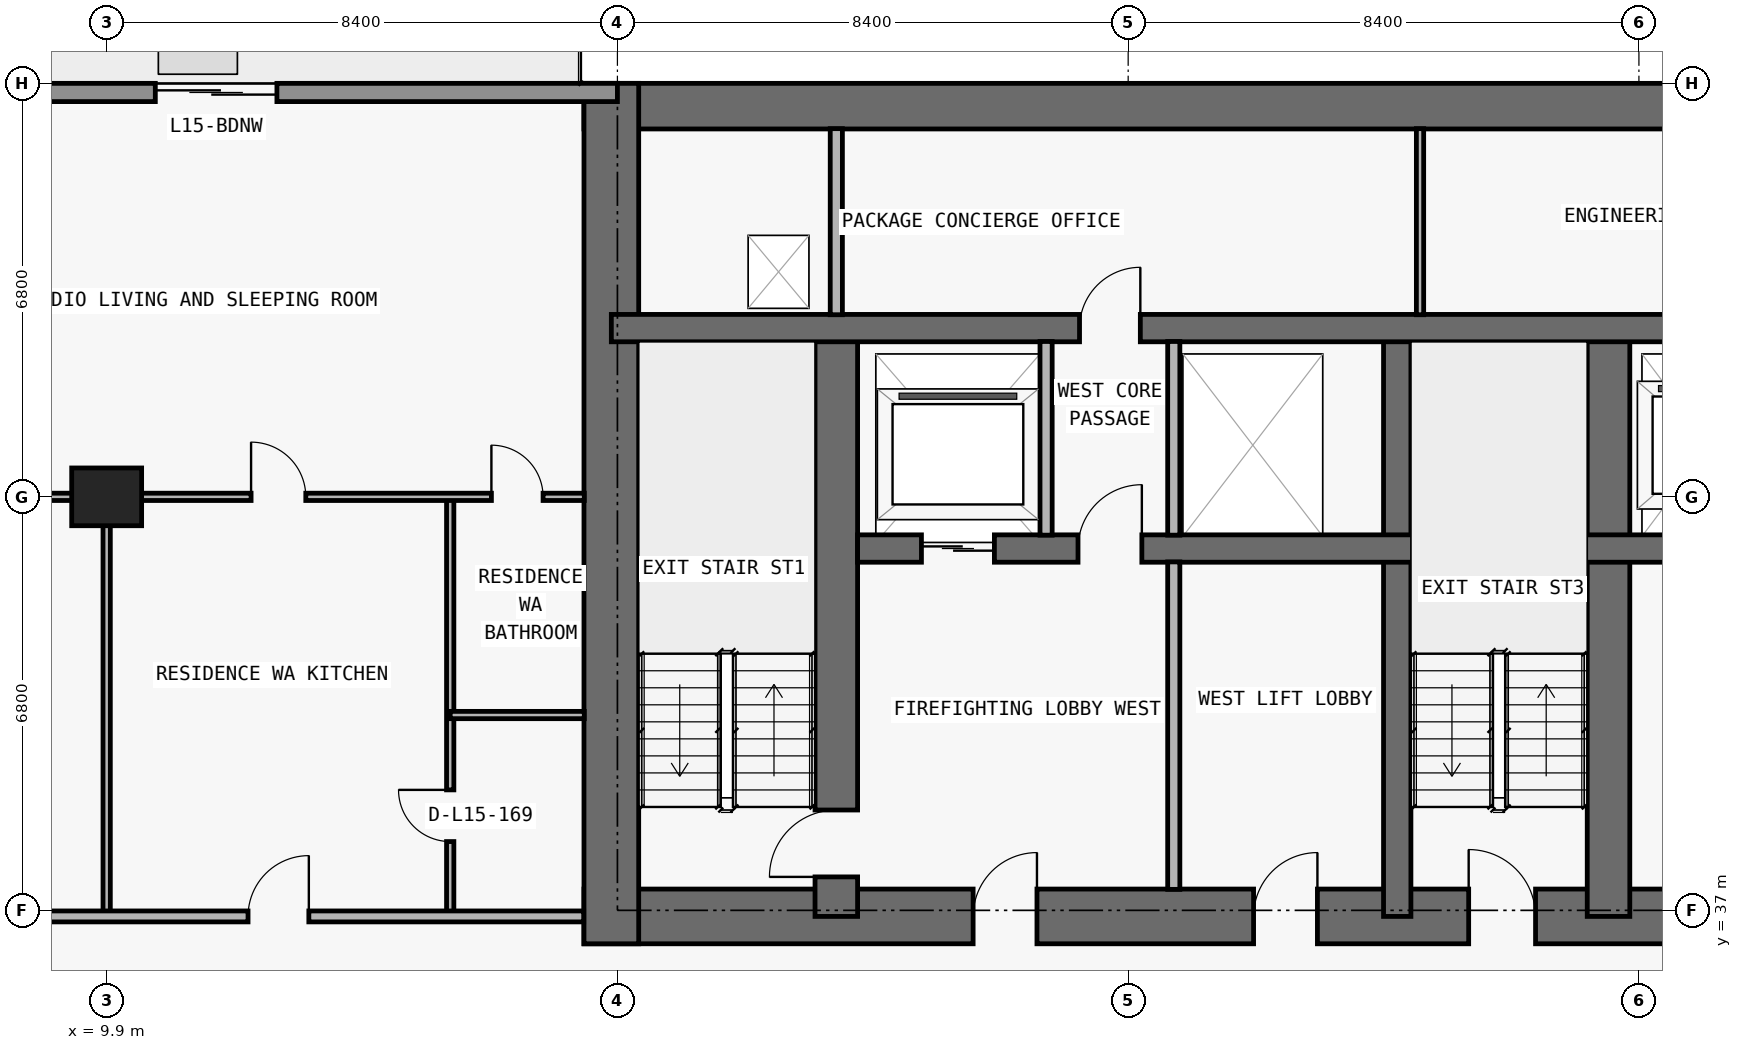
"""IFC4 building model, lengths in metres.
Left out: names, types, materials, properties, quantities, classifications, styles, units other than length and angle.
Written with IfcOpenShell. Run it as: python <this file> out.ifc"""

import sys

from ifc_helpers import new_model, si_unit, direction, frame, frame_2d, origin, origin_2d, place, context, subcontext, project, spatial, rectangle, extrude, element, fill, save


model = new_model("IFC4")
c1 = context("Model", 3, precision=1e-05, world=origin(), true_north=direction((0.0, 1.0)))
c2 = subcontext(c1, "Body", "Model", "MODEL_VIEW")
j1 = project(units=[si_unit("LENGTHUNIT", "METRE"), si_unit("PLANEANGLEUNIT", "RADIAN")], contexts=[c1])
p1 = place(None, origin())
s1 = spatial("IfcSite", under=j1, at=p1, CompositionType="ELEMENT")
p2 = place(p1, origin())
s2 = spatial("IfcBuilding", under=s1, at=p2, CompositionType="ELEMENT")
p3 = place(p2, frame((0.0, 0.0, 59.7)))
s3 = spatial("IfcBuildingStorey", under=s2, at=p3, CompositionType="ELEMENT", Elevation=59.7)
p4 = place(p3, frame((9.9, 43.8, 0.0), z_axis=(0.0, 0.0, 1.0), x_axis=(1.0, 0.0, 0.0)))
e1 = element("IfcColumn", 1, at=p4, inside=s3, PredefinedType="COLUMN", context=c2, shape_type="SweptSolid", body=[
    extrude(rectangle(XDim=1.15, YDim=0.95, at=origin_2d()), origin(), (0.0, 0.0, 1.0), 3.05),
])
p5 = place(p3, frame((17.75, 36.9, 0.0), z_axis=(0.0, 0.0, 1.0), x_axis=(1.0, 0.0, 0.0)))
e2 = element("IfcWall", 2, at=p5, inside=s3, PredefinedType="SHEAR", context=c2, shape_type="SweptSolid", body=[
    extrude(rectangle(XDim=42.3, YDim=0.9, at=frame_2d((21.15, 0.0))), origin(), (0.0, 0.0, 1.0), 3.05),
])
p6 = place(p5, frame((14.55, 0.0, 0.0)))
e3 = element("IfcOpeningElement", 3, at=p6, cuts=e2, PredefinedType="OPENING", context=c2, shape_type="SweptSolid", body=[
    extrude(rectangle(XDim=1.1, YDim=2.15, at=frame_2d((0.55, 1.075))), frame((0.0, 0.46, 0.0), z_axis=(0.0, -1.0, 0.0), x_axis=(1.0, 0.0, 0.0)), (0.0, 0.0, 1.0), 0.92),
])
p7 = place(p5, frame((6.4, 0.0, 0.0)))
e4 = element("IfcOpeningElement", 4, at=p7, cuts=e2, PredefinedType="OPENING", context=c2, shape_type="SweptSolid", body=[
    extrude(rectangle(XDim=1.05, YDim=2.15, at=frame_2d((0.525, 1.075))), frame((0.0, 0.46, 0.0), z_axis=(0.0, -1.0, 0.0), x_axis=(1.0, 0.0, 0.0)), (0.0, 0.0, 1.0), 0.92),
])
p8 = place(p5, frame((34.9, 0.0, 0.0)))
e5 = element("IfcOpeningElement", 5, at=p8, cuts=e2, PredefinedType="OPENING", context=c2, shape_type="SweptSolid", body=[
    extrude(rectangle(XDim=1.05, YDim=2.15, at=frame_2d((0.525, 1.075))), frame((0.0, 0.46, 0.0), z_axis=(0.0, -1.0, 0.0), x_axis=(1.0, 0.0, 0.0)), (0.0, 0.0, 1.0), 0.92),
])
p9 = place(p5, frame((11.012, 0.0, 0.0)))
e6 = element("IfcOpeningElement", 6, at=p9, cuts=e2, PredefinedType="OPENING", context=c2, shape_type="SweptSolid", body=[
    extrude(rectangle(XDim=1.05, YDim=2.15, at=frame_2d((0.525, 1.075))), frame((0.0, 0.46, 0.0), z_axis=(0.0, -1.0, 0.0), x_axis=(1.0, 0.0, 0.0)), (0.0, 0.0, 1.0), 0.92),
])
p10 = place(p5, frame((24.25, 0.0, 0.0)))
e7 = element("IfcOpeningElement", 7, at=p10, cuts=e2, PredefinedType="OPENING", context=c2, shape_type="SweptSolid", body=[
    extrude(rectangle(XDim=1.05, YDim=2.15, at=frame_2d((0.525, 1.075))), frame((0.0, 0.46, 0.0), z_axis=(0.0, -1.0, 0.0), x_axis=(1.0, 0.0, 0.0)), (0.0, 0.0, 1.0), 0.92),
])
p11 = place(p3, frame((17.75, 50.225, 0.0), z_axis=(0.0, 0.0, 1.0), x_axis=(1.0, 0.0, 0.0)))
e8 = element("IfcWall", 8, at=p11, inside=s3, PredefinedType="SHEAR", context=c2, shape_type="SweptSolid", body=[
    extrude(rectangle(XDim=42.3, YDim=0.75, at=frame_2d((21.15, 0.0))), origin(), (0.0, 0.0, 1.0), 3.05),
])
p12 = place(p3, frame((18.2, 36.45, 0.0), z_axis=(0.0, 0.0, 1.0), x_axis=(0.0, 1.0, 0.0)))
e9 = element("IfcWall", 9, at=p12, inside=s3, PredefinedType="SHEAR", context=c2, shape_type="SweptSolid", body=[
    extrude(rectangle(XDim=14.15, YDim=0.9, at=frame_2d((7.075, 0.0))), origin(), (0.0, 0.0, 1.0), 3.05),
])
p13 = place(p3, frame((21.9, 36.9, 0.0), z_axis=(0.0, 0.0, 1.0), x_axis=(0.0, 1.0, 0.0)))
e10 = element("IfcWall", 10, at=p13, inside=s3, PredefinedType="SHEAR", context=c2, shape_type="SweptSolid", body=[
    extrude(rectangle(XDim=9.675, YDim=0.7, at=frame_2d((4.837, 0.0))), origin(), (0.0, 0.0, 1.0), 3.05),
])
p14 = place(p13, frame((0.65, 0.0, 0.0)))
e11 = element("IfcOpeningElement", 11, at=p14, cuts=e10, PredefinedType="OPENING", context=c2, shape_type="SweptSolid", body=[
    extrude(rectangle(XDim=1.1, YDim=2.15, at=frame_2d((0.55, 1.075))), frame((0.0, 0.36, 0.0), z_axis=(0.0, -1.0, 0.0), x_axis=(1.0, 0.0, 0.0)), (0.0, 0.0, 1.0), 0.72),
])
p15 = place(p3, frame((31.125, 36.9, 0.0), z_axis=(0.0, 0.0, 1.0), x_axis=(0.0, 1.0, 0.0)))
e12 = element("IfcWall", 12, at=p15, inside=s3, PredefinedType="SHEAR", context=c2, shape_type="SweptSolid", body=[
    extrude(rectangle(XDim=9.675, YDim=0.45, at=frame_2d((4.837, 0.0))), origin(), (0.0, 0.0, 1.0), 3.05),
])
p16 = place(p3, frame((34.6, 36.9, 0.0), z_axis=(0.0, 0.0, 1.0), x_axis=(0.0, 1.0, 0.0)))
e13 = element("IfcWall", 13, at=p16, inside=s3, PredefinedType="SHEAR", context=c2, shape_type="SweptSolid", body=[
    extrude(rectangle(XDim=9.675, YDim=0.7, at=frame_2d((4.837, 0.0))), origin(), (0.0, 0.0, 1.0), 3.05),
])
p17 = place(p3, frame((22.25, 42.95, 0.0), z_axis=(0.0, 0.0, 1.0), x_axis=(1.0, 0.0, 0.0)))
e14 = element("IfcWall", 14, at=p17, inside=s3, PredefinedType="SHEAR", context=c2, shape_type="SweptSolid", body=[
    extrude(rectangle(XDim=33.3, YDim=0.45, at=frame_2d((16.65, 0.0))), origin(), (0.0, 0.0, 1.0), 3.05),
])
p18 = place(p17, frame((1.05, 0.0, 0.0)))
e15 = element("IfcOpeningElement", 15, at=p18, cuts=e14, PredefinedType="OPENING", context=c2, shape_type="SweptSolid", body=[
    extrude(rectangle(XDim=1.2, YDim=2.2, at=frame_2d((0.6, 1.1))), frame((0.0, 0.235, 0.0), z_axis=(0.0, -1.0, 0.0), x_axis=(1.0, 0.0, 0.0)), (0.0, 0.0, 1.0), 0.47),
])
p19 = place(p17, frame((31.05, 0.0, 0.0)))
e16 = element("IfcOpeningElement", 16, at=p19, cuts=e14, PredefinedType="OPENING", context=c2, shape_type="SweptSolid", body=[
    extrude(rectangle(XDim=1.2, YDim=2.2, at=frame_2d((0.6, 1.1))), frame((0.0, 0.235, 0.0), z_axis=(0.0, -1.0, 0.0), x_axis=(1.0, 0.0, 0.0)), (0.0, 0.0, 1.0), 0.47),
])
p20 = place(p17, frame((13.5, 0.0, 0.0)))
e17 = element("IfcOpeningElement", 17, at=p20, cuts=e14, PredefinedType="OPENING", context=c2, shape_type="SweptSolid", body=[
    extrude(rectangle(XDim=1.1, YDim=2.2, at=frame_2d((0.55, 1.1))), frame((0.0, 0.235, 0.0), z_axis=(0.0, -1.0, 0.0), x_axis=(1.0, 0.0, 0.0)), (0.0, 0.0, 1.0), 0.47),
])
p21 = place(p17, frame((16.1, 0.0, 0.0)))
e18 = element("IfcOpeningElement", 18, at=p21, cuts=e14, PredefinedType="OPENING", context=c2, shape_type="SweptSolid", body=[
    extrude(rectangle(XDim=1.1, YDim=2.2, at=frame_2d((0.55, 1.1))), frame((0.0, 0.235, 0.0), z_axis=(0.0, -1.0, 0.0), x_axis=(1.0, 0.0, 0.0)), (0.0, 0.0, 1.0), 0.47),
])
p22 = place(p17, frame((18.7, 0.0, 0.0)))
e19 = element("IfcOpeningElement", 19, at=p22, cuts=e14, PredefinedType="OPENING", context=c2, shape_type="SweptSolid", body=[
    extrude(rectangle(XDim=1.1, YDim=2.2, at=frame_2d((0.55, 1.1))), frame((0.0, 0.235, 0.0), z_axis=(0.0, -1.0, 0.0), x_axis=(1.0, 0.0, 0.0)), (0.0, 0.0, 1.0), 0.47),
])
p23 = place(p17, frame((3.625, 0.0, 0.0)))
e20 = element("IfcOpeningElement", 20, at=p23, cuts=e14, PredefinedType="OPENING", context=c2, shape_type="SweptSolid", body=[
    extrude(rectangle(XDim=1.05, YDim=2.15, at=frame_2d((0.525, 1.075))), frame((0.0, 0.235, 0.0), z_axis=(0.0, -1.0, 0.0), x_axis=(1.0, 0.0, 0.0)), (0.0, 0.0, 1.0), 0.47),
])
p24 = place(p17, frame((28.675, 0.0, 0.0)))
e21 = element("IfcOpeningElement", 21, at=p24, cuts=e14, PredefinedType="OPENING", context=c2, shape_type="SweptSolid", body=[
    extrude(rectangle(XDim=1.05, YDim=2.15, at=frame_2d((0.525, 1.075))), frame((0.0, 0.235, 0.0), z_axis=(0.0, -1.0, 0.0), x_axis=(1.0, 0.0, 0.0)), (0.0, 0.0, 1.0), 0.47),
])
p25 = place(p3, frame((18.2, 46.575, 0.0), z_axis=(0.0, 0.0, 1.0), x_axis=(1.0, 0.0, 0.0)))
e22 = element("IfcWall", 22, at=p25, inside=s3, PredefinedType="SHEAR", context=c2, shape_type="SweptSolid", body=[
    extrude(rectangle(XDim=41.4, YDim=0.45, at=frame_2d((20.7, 0.0))), origin(), (0.0, 0.0, 1.0), 3.05),
])
p26 = place(p25, frame((7.7, 0.0, 0.0)))
e23 = element("IfcOpeningElement", 23, at=p26, cuts=e22, PredefinedType="OPENING", context=c2, shape_type="SweptSolid", body=[
    extrude(rectangle(XDim=1.0, YDim=2.2, at=frame_2d((0.5, 1.1))), frame((0.0, 0.235, 0.0), z_axis=(0.0, -1.0, 0.0), x_axis=(1.0, 0.0, 0.0)), (0.0, 0.0, 1.0), 0.47),
])
p27 = place(p25, frame((32.725, 0.0, 0.0)))
e24 = element("IfcOpeningElement", 24, at=p27, cuts=e22, PredefinedType="OPENING", context=c2, shape_type="SweptSolid", body=[
    extrude(rectangle(XDim=1.05, YDim=2.15, at=frame_2d((0.525, 1.075))), frame((0.0, 0.235, 0.0), z_axis=(0.0, -1.0, 0.0), x_axis=(1.0, 0.0, 0.0)), (0.0, 0.0, 1.0), 0.47),
])
p28 = place(p3, frame((5.1, 50.45, 0.0), z_axis=(0.0, 0.0, 1.0), x_axis=(1.0, 0.0, 0.0)))
e25 = element("IfcWall", 25, at=p28, inside=s3, PredefinedType="STANDARD", context=c2, shape_type="SweptSolid", body=[
    extrude(rectangle(XDim=13.2, YDim=0.3, at=frame_2d((6.6, 0.0))), origin(), (0.0, 0.0, 1.0), 3.05),
])
p29 = place(p28, frame((5.6, 0.0, 0.0)))
e26 = element("IfcOpeningElement", 26, at=p29, cuts=e25, PredefinedType="OPENING", context=c2, shape_type="SweptSolid", body=[
    extrude(rectangle(XDim=2.0, YDim=2.3, at=frame_2d((1.0, 1.15))), frame((0.0, 0.16, 0.0), z_axis=(0.0, -1.0, 0.0), x_axis=(1.0, 0.0, 0.0)), (0.0, 0.0, 1.0), 0.32),
])
p30 = place(p3, frame((9.9, 36.9, 0.0), z_axis=(0.0, 0.0, 1.0), x_axis=(0.0, 1.0, 0.0)))
e27 = element("IfcWall", 27, at=p30, inside=s3, PredefinedType="PARTITIONING", context=c2, shape_type="SweptSolid", body=[
    extrude(rectangle(XDim=6.9, YDim=0.12, at=frame_2d((3.45, 0.0))), origin(), (0.0, 0.0, 1.0), 2.11),
])
p31 = place(p3, frame((15.55, 36.9, 0.0), z_axis=(0.0, 0.0, 1.0), x_axis=(0.0, 1.0, 0.0)))
e28 = element("IfcWall", 28, at=p31, inside=s3, PredefinedType="PARTITIONING", context=c2, shape_type="SweptSolid", body=[
    extrude(rectangle(XDim=6.9, YDim=0.12, at=frame_2d((3.45, 0.0))), origin(), (0.0, 0.0, 1.0), 3.05),
])
p32 = place(p31, frame((1.231, 0.0, 0.0)))
e29 = element("IfcOpeningElement", 29, at=p32, cuts=e28, PredefinedType="OPENING", context=c2, shape_type="SweptSolid", body=[
    extrude(rectangle(XDim=0.85, YDim=2.1, at=frame_2d((0.425, 1.05))), frame((0.0, 0.07, 0.0), z_axis=(0.0, -1.0, 0.0), x_axis=(1.0, 0.0, 0.0)), (0.0, 0.0, 1.0), 0.14),
])
p33 = place(p3, frame((21.9, 46.795, 0.0), z_axis=(0.0, 0.0, 1.0), x_axis=(0.0, 1.0, 0.0)))
e30 = element("IfcWall", 30, at=p33, inside=s3, PredefinedType="PARTITIONING", context=c2, shape_type="SweptSolid", body=[
    extrude(rectangle(XDim=3.06, YDim=0.2, at=frame_2d((1.53, 0.0))), origin(), (0.0, 0.0, 1.0), 3.05),
])
p34 = place(p3, frame((25.35, 43.17, 0.0), z_axis=(0.0, 0.0, 1.0), x_axis=(0.0, 1.0, 0.0)))
e31 = element("IfcWall", 31, at=p34, inside=s3, PredefinedType="PARTITIONING", context=c2, shape_type="SweptSolid", body=[
    extrude(rectangle(XDim=3.185, YDim=0.2, at=frame_2d((1.593, 0.0))), origin(), (0.0, 0.0, 1.0), 3.05),
])
p35 = place(p3, frame((27.45, 37.345, 0.0), z_axis=(0.0, 0.0, 1.0), x_axis=(0.0, 1.0, 0.0)))
e32 = element("IfcWall", 32, at=p35, inside=s3, PredefinedType="PARTITIONING", context=c2, shape_type="SweptSolid", body=[
    extrude(rectangle(XDim=5.385, YDim=0.2, at=frame_2d((2.692, 0.0))), origin(), (0.0, 0.0, 1.0), 3.05),
])
p36 = place(p3, frame((27.45, 43.17, 0.0), z_axis=(0.0, 0.0, 1.0), x_axis=(0.0, 1.0, 0.0)))
e33 = element("IfcWall", 33, at=p36, inside=s3, PredefinedType="PARTITIONING", context=c2, shape_type="SweptSolid", body=[
    extrude(rectangle(XDim=3.185, YDim=0.2, at=frame_2d((1.593, 0.0))), origin(), (0.0, 0.0, 1.0), 3.05),
])
p37 = place(p3, frame((31.5, 46.795, 0.0), z_axis=(0.0, 0.0, 1.0), x_axis=(0.0, 1.0, 0.0)))
e34 = element("IfcWall", 34, at=p37, inside=s3, PredefinedType="PARTITIONING", context=c2, shape_type="SweptSolid", body=[
    extrude(rectangle(XDim=3.06, YDim=0.12, at=frame_2d((1.53, 0.0))), origin(), (0.0, 0.0, 1.0), 3.05),
])
p38 = place(p3, frame((5.1, 36.9, 0.0), z_axis=(0.0, 0.0, 1.0), x_axis=(1.0, 0.0, 0.0)))
e35 = element("IfcWall", 35, at=p38, inside=s3, PredefinedType="PARTITIONING", context=c2, shape_type="SweptSolid", body=[
    extrude(rectangle(XDim=12.645, YDim=0.18, at=frame_2d((6.323, 0.0))), origin(), (0.0, 0.0, 1.0), 3.05),
])
p39 = place(p38, frame((7.125, 0.0, 0.0)))
e36 = element("IfcOpeningElement", 36, at=p39, cuts=e35, PredefinedType="OPENING", context=c2, shape_type="SweptSolid", body=[
    extrude(rectangle(XDim=1.0, YDim=2.2, at=frame_2d((0.5, 1.1))), frame((0.0, 0.1, 0.0), z_axis=(0.0, -1.0, 0.0), x_axis=(1.0, 0.0, 0.0)), (0.0, 0.0, 1.0), 0.2),
])
p40 = place(p3, frame((15.55, 40.212, 0.0), z_axis=(0.0, 0.0, 1.0), x_axis=(1.0, 0.0, 0.0)))
e37 = element("IfcWall", 37, at=p40, inside=s3, PredefinedType="PARTITIONING", context=c2, shape_type="SweptSolid", body=[
    extrude(rectangle(XDim=2.205, YDim=0.12, at=frame_2d((1.103, 0.0))), origin(), (0.0, 0.0, 1.0), 3.05),
])
p41 = place(p3, frame((1.795, 43.8, 0.0), z_axis=(0.0, 0.0, 1.0), x_axis=(1.0, 0.0, 0.0)))
e38 = element("IfcWall", 38, at=p41, inside=s3, PredefinedType="PARTITIONING", context=c2, shape_type="SweptSolid", body=[
    extrude(rectangle(XDim=15.96, YDim=0.12, at=frame_2d((7.98, 0.0))), origin(), (0.0, 0.0, 1.0), 2.339),
])
p42 = place(p41, frame((5.255, 0.0, 0.0)))
e39 = element("IfcOpeningElement", 39, at=p42, cuts=e38, PredefinedType="OPENING", context=c2, shape_type="SweptSolid", body=[
    extrude(rectangle(XDim=0.9, YDim=2.15, at=frame_2d((0.45, 1.075))), frame((0.0, 0.07, 0.0), z_axis=(0.0, -1.0, 0.0), x_axis=(1.0, 0.0, 0.0)), (0.0, 0.0, 1.0), 0.14),
])
p43 = place(p41, frame((10.48, 0.0, 0.0)))
e40 = element("IfcOpeningElement", 40, at=p43, cuts=e38, PredefinedType="OPENING", context=c2, shape_type="SweptSolid", body=[
    extrude(rectangle(XDim=0.9, YDim=2.15, at=frame_2d((0.45, 1.075))), frame((0.0, 0.07, 0.0), z_axis=(0.0, -1.0, 0.0), x_axis=(1.0, 0.0, 0.0)), (0.0, 0.0, 1.0), 0.14),
])
p44 = place(p41, frame((14.433, 0.0, 0.0)))
e41 = element("IfcOpeningElement", 41, at=p44, cuts=e38, PredefinedType="OPENING", context=c2, shape_type="SweptSolid", body=[
    extrude(rectangle(XDim=0.85, YDim=2.1, at=frame_2d((0.425, 1.05))), frame((0.0, 0.07, 0.0), z_axis=(0.0, -1.0, 0.0), x_axis=(1.0, 0.0, 0.0)), (0.0, 0.0, 1.0), 0.14),
])
p45 = place(p29, origin())
e42 = element("IfcDoor", 42, at=p45, inside=s3, OperationType="DOUBLE_DOOR_SLIDING", PredefinedType="DOOR", context=c2, shape_type="SweptSolid", body=[
    extrude(rectangle(XDim=2.0, YDim=2.3, at=frame_2d((1.0, 1.15))), frame((0.0, 0.025, 0.0), z_axis=(0.0, -1.0, 0.0), x_axis=(1.0, 0.0, 0.0)), (0.0, 0.0, 1.0), 0.05),
])
fill(e26, e42)
p46 = place(p18, origin())
e43 = element("IfcDoor", 43, at=p46, inside=s3, OperationType="DOUBLE_DOOR_SLIDING", PredefinedType="DOOR", context=c2, shape_type="SweptSolid", body=[
    extrude(rectangle(XDim=1.2, YDim=2.2, at=frame_2d((0.6, 1.1))), frame((0.0, 0.025, 0.0), z_axis=(0.0, -1.0, 0.0), x_axis=(1.0, 0.0, 0.0)), (0.0, 0.0, 1.0), 0.05),
])
fill(e15, e43)
p47 = place(p6, origin())
e44 = element("IfcDoor", 44, at=p47, inside=s3, OperationType="SINGLE_SWING_LEFT", PredefinedType="DOOR", context=c2, shape_type="SweptSolid", body=[
    extrude(rectangle(XDim=1.1, YDim=2.15, at=frame_2d((0.55, 1.075))), frame((0.0, 0.025, 0.0), z_axis=(0.0, -1.0, 0.0), x_axis=(1.0, 0.0, 0.0)), (0.0, 0.0, 1.0), 0.05),
])
fill(e3, e44)
p48 = place(p7, origin())
e45 = element("IfcDoor", 45, at=p48, inside=s3, OperationType="SINGLE_SWING_RIGHT", PredefinedType="DOOR", context=c2, shape_type="SweptSolid", body=[
    extrude(rectangle(XDim=1.05, YDim=2.15, at=frame_2d((0.525, 1.075))), frame((0.0, 0.025, 0.0), z_axis=(0.0, -1.0, 0.0), x_axis=(1.0, 0.0, 0.0)), (0.0, 0.0, 1.0), 0.05),
])
fill(e4, e45)
p49 = place(p14, origin())
e46 = element("IfcDoor", 46, at=p49, inside=s3, OperationType="SINGLE_SWING_LEFT", PredefinedType="DOOR", context=c2, shape_type="SweptSolid", body=[
    extrude(rectangle(XDim=1.1, YDim=2.15, at=frame_2d((0.55, 1.075))), frame((0.0, 0.025, 0.0), z_axis=(0.0, -1.0, 0.0), x_axis=(1.0, 0.0, 0.0)), (0.0, 0.0, 1.0), 0.05),
])
fill(e11, e46)
p50 = place(p23, origin())
e47 = element("IfcDoor", 47, at=p50, inside=s3, OperationType="SINGLE_SWING_RIGHT", PredefinedType="DOOR", context=c2, shape_type="SweptSolid", body=[
    extrude(rectangle(XDim=1.05, YDim=2.15, at=frame_2d((0.525, 1.075))), frame((0.0, 0.025, 0.0), z_axis=(0.0, -1.0, 0.0), x_axis=(1.0, 0.0, 0.0)), (0.0, 0.0, 1.0), 0.05),
])
fill(e20, e47)
p51 = place(p9, origin())
e48 = element("IfcDoor", 48, at=p51, inside=s3, OperationType="SINGLE_SWING_RIGHT", PredefinedType="DOOR", context=c2, shape_type="SweptSolid", body=[
    extrude(rectangle(XDim=1.05, YDim=2.15, at=frame_2d((0.525, 1.075))), frame((0.0, 0.025, 0.0), z_axis=(0.0, -1.0, 0.0), x_axis=(1.0, 0.0, 0.0)), (0.0, 0.0, 1.0), 0.05),
])
fill(e6, e48)
p52 = place(p26, origin())
e49 = element("IfcDoor", 49, at=p52, inside=s3, OperationType="SINGLE_SWING_RIGHT", PredefinedType="DOOR", context=c2, shape_type="SweptSolid", body=[
    extrude(rectangle(XDim=1.0, YDim=2.2, at=frame_2d((0.5, 1.1))), frame((0.0, 0.025, 0.0), z_axis=(0.0, -1.0, 0.0), x_axis=(1.0, 0.0, 0.0)), (0.0, 0.0, 1.0), 0.05),
])
fill(e23, e49)
p53 = place(p39, origin())
e50 = element("IfcDoor", 50, at=p53, inside=s3, OperationType="SINGLE_SWING_RIGHT", PredefinedType="DOOR", context=c2, shape_type="SweptSolid", body=[
    extrude(rectangle(XDim=1.0, YDim=2.2, at=frame_2d((0.5, 1.1))), frame((0.0, 0.025, 0.0), z_axis=(0.0, -1.0, 0.0), x_axis=(1.0, 0.0, 0.0)), (0.0, 0.0, 1.0), 0.05),
])
fill(e36, e50)
p54 = place(p43, origin())
e51 = element("IfcDoor", 51, at=p54, inside=s3, OperationType="SINGLE_SWING_LEFT", PredefinedType="DOOR", context=c2, shape_type="SweptSolid", body=[
    extrude(rectangle(XDim=0.9, YDim=2.15, at=frame_2d((0.45, 1.075))), frame((0.0, 0.025, 0.0), z_axis=(0.0, -1.0, 0.0), x_axis=(1.0, 0.0, 0.0)), (0.0, 0.0, 1.0), 0.05),
])
fill(e40, e51)
p55 = place(p32, origin())
e52 = element("IfcDoor", 52, at=p55, inside=s3, OperationType="SINGLE_SWING_RIGHT", PredefinedType="DOOR", context=c2, shape_type="SweptSolid", body=[
    extrude(rectangle(XDim=0.85, YDim=2.1, at=frame_2d((0.425, 1.05))), frame((0.0, 0.025, 0.0), z_axis=(0.0, -1.0, 0.0), x_axis=(1.0, 0.0, 0.0)), (0.0, 0.0, 1.0), 0.05),
])
fill(e29, e52)
p56 = place(p44, origin())
e53 = element("IfcDoor", 53, at=p56, inside=s3, OperationType="SINGLE_SWING_LEFT", PredefinedType="DOOR", context=c2, shape_type="SweptSolid", body=[
    extrude(rectangle(XDim=0.85, YDim=2.1, at=frame_2d((0.425, 1.05))), frame((0.0, 0.025, 0.0), z_axis=(0.0, -1.0, 0.0), x_axis=(1.0, 0.0, 0.0)), (0.0, 0.0, 1.0), 0.05),
])
fill(e41, e53)
save(model, sys.argv[1])
